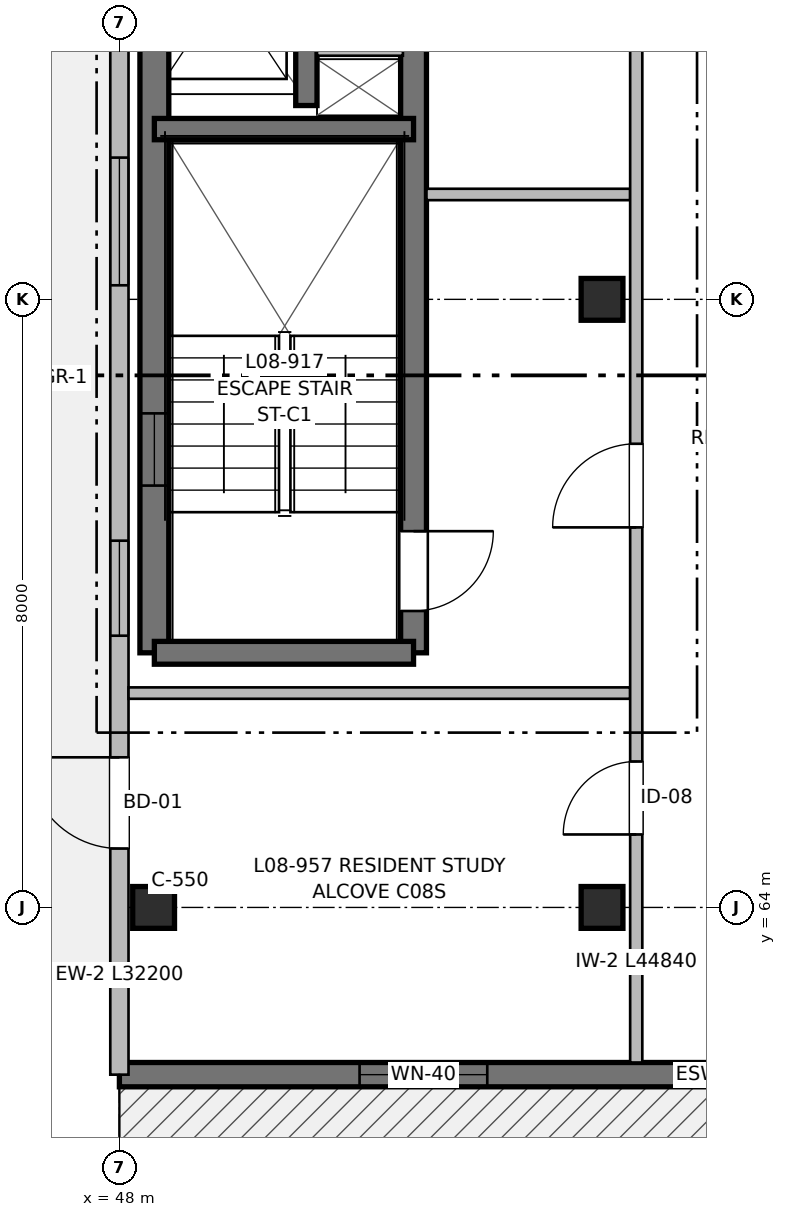
"""IFC4 building model, lengths in metres.
Left out: names, types, materials, properties, quantities, classifications, styles, units other than length and angle.
Written with IfcOpenShell. Run it as: python <this file> out.ifc"""

import sys

from ifc_helpers import new_model, si_unit, direction, frame, frame_2d, origin, origin_2d, place, context, subcontext, project, spatial, rectangle, extrude, element, fill, save


model = new_model("IFC4")
c1 = context("Model", 3, precision=1e-05, world=origin(), true_north=direction((0.0, 1.0)))
c2 = subcontext(c1, "Body", "Model", "MODEL_VIEW")
j1 = project(units=[si_unit("LENGTHUNIT", "METRE"), si_unit("PLANEANGLEUNIT", "RADIAN")], contexts=[c1])
p1 = place(None, origin())
s1 = spatial("IfcSite", under=j1, at=p1, CompositionType="ELEMENT")
p2 = place(p1, origin())
s2 = spatial("IfcBuilding", under=s1, at=p2, CompositionType="ELEMENT")
p3 = place(p2, frame((0.0, 0.0, 26.56)))
s3 = spatial("IfcBuildingStorey", under=s2, at=p3, CompositionType="ELEMENT", Elevation=26.56)
for number, where, z_axis, x_axis in (
    (1, (48.45, 64.0, 0.0), (0.0, 0.0, 1.0), (1.0, 0.0, 0.0)),
    (2, (54.35, 64.0, 0.0), (0.0, 0.0, 1.0), (1.0, 0.0, 0.0)),
    (3, (54.35, 72.0, 0.0), (0.0, 0.0, 1.0), (1.0, 0.0, 0.0)),
):
    element("IfcColumn", number, at=place(p3, frame(where, z_axis=z_axis, x_axis=x_axis)), inside=s3, PredefinedType="COLUMN", context=c2, shape_type="SweptSolid", body=[
        extrude(rectangle(XDim=0.55, YDim=0.55, at=origin_2d()), origin(), (0.0, 0.0, 1.0), 3.2),
    ])
p4 = place(p3, frame((48.46, 67.35, 0.0), z_axis=(0.0, 0.0, 1.0), x_axis=(0.0, 1.0, 0.0)))
e4 = element("IfcWall", 4, at=p4, inside=s3, PredefinedType="SHEAR", context=c2, shape_type="SweptSolid", body=[
    extrude(rectangle(XDim=12.45, YDim=0.38, at=frame_2d((6.225, 0.0))), origin(), (0.0, 0.0, 1.0), 3.2),
])
p5 = place(p4, frame((2.2, 0.0, 0.97)))
e5 = element("IfcOpeningElement", 5, at=p5, cuts=e4, PredefinedType="OPENING", context=c2, shape_type="SweptSolid", body=[
    extrude(rectangle(XDim=0.95, YDim=1.25, at=frame_2d((0.475, 0.625))), frame((0.0, 0.2, 0.0), z_axis=(0.0, -1.0, 0.0), x_axis=(1.0, 0.0, 0.0)), (0.0, 0.0, 1.0), 0.4),
])
p6 = place(p3, frame((51.87, 79.8, 0.0), z_axis=(0.0, 0.0, 1.0), x_axis=(0.0, -1.0, 0.0)))
e6 = element("IfcWall", 6, at=p6, inside=s3, PredefinedType="SHEAR", context=c2, shape_type="SweptSolid", body=[
    extrude(rectangle(XDim=12.45, YDim=0.34, at=frame_2d((6.225, 0.0))), origin(), (0.0, 0.0, 1.0), 3.2),
])
p7 = place(p6, frame((10.85, 0.0, 0.0)))
e7 = element("IfcOpeningElement", 7, at=p7, cuts=e6, PredefinedType="OPENING", context=c2, shape_type="SweptSolid", body=[
    extrude(rectangle(XDim=1.05, YDim=2.15, at=frame_2d((0.525, 1.075))), frame((0.0, 0.18, 0.0), z_axis=(0.0, -1.0, 0.0), x_axis=(1.0, 0.0, 0.0)), (0.0, 0.0, 1.0), 0.36),
])
p8 = place(p3, frame((51.87, 67.35, 0.0), z_axis=(0.0, 0.0, 1.0), x_axis=(-1.0, 0.0, 0.0)))
e8 = element("IfcWall", 8, at=p8, inside=s3, PredefinedType="SHEAR", context=c2, shape_type="SweptSolid", body=[
    extrude(rectangle(XDim=3.41, YDim=0.3, at=frame_2d((1.705, 0.0))), origin(), (0.0, 0.0, 1.0), 3.2),
])
p9 = place(p3, frame((48.46, 74.24, 0.0), z_axis=(0.0, 0.0, 1.0), x_axis=(1.0, 0.0, 0.0)))
e9 = element("IfcWall", 9, at=p9, inside=s3, PredefinedType="SHEAR", context=c2, shape_type="SweptSolid", body=[
    extrude(rectangle(XDim=3.41, YDim=0.28, at=frame_2d((1.705, 0.0))), origin(), (0.0, 0.0, 1.0), 3.2),
])
p10 = place(p3, frame((50.46, 74.55, 0.0), z_axis=(0.0, 0.0, 1.0), x_axis=(0.0, 1.0, 0.0)))
e10 = element("IfcWall", 10, at=p10, inside=s3, PredefinedType="SHEAR", context=c2, shape_type="SweptSolid", body=[
    extrude(rectangle(XDim=5.25, YDim=0.28, at=frame_2d((2.625, 0.0))), origin(), (0.0, 0.0, 1.0), 3.2),
])
p11 = place(p10, frame((1.15, 0.0, 0.0)))
e11 = element("IfcOpeningElement", 11, at=p11, cuts=e10, PredefinedType="OPENING", context=c2, shape_type="SweptSolid", body=[
    extrude(rectangle(XDim=1.0, YDim=2.15, at=frame_2d((0.5, 1.075))), frame((0.0, 0.15, 0.0), z_axis=(0.0, -1.0, 0.0), x_axis=(1.0, 0.0, 0.0)), (0.0, 0.0, 1.0), 0.3),
])
p12 = place(p10, frame((3.85, 0.0, 0.0)))
e12 = element("IfcOpeningElement", 12, at=p12, cuts=e10, PredefinedType="OPENING", context=c2, shape_type="SweptSolid", body=[
    extrude(rectangle(XDim=0.9, YDim=2.15, at=frame_2d((0.45, 1.075))), frame((0.0, 0.15, 0.0), z_axis=(0.0, -1.0, 0.0), x_axis=(1.0, 0.0, 0.0)), (0.0, 0.0, 1.0), 0.3),
])
p13 = place(p3, frame((50.6, 75.28, 0.0), z_axis=(0.0, 0.0, 1.0), x_axis=(1.0, 0.0, 0.0)))
e13 = element("IfcWall", 13, at=p13, inside=s3, PredefinedType="PARTITIONING", context=c2, shape_type="SweptSolid", body=[
    extrude(rectangle(XDim=1.13, YDim=0.15, at=frame_2d((0.565, 0.0))), origin(), (0.0, 0.0, 1.0), 2.95),
])
p14 = place(p3, frame((64.0, 61.8, 0.0), z_axis=(0.0, 0.0, 1.0), x_axis=(-1.0, 0.0, 0.0)))
e14 = element("IfcWall", 14, at=p14, inside=s3, PredefinedType="SHEAR", context=c2, shape_type="SweptSolid", body=[
    extrude(rectangle(XDim=16.0, YDim=0.32, at=frame_2d((8.0, 0.0))), origin(), (0.0, 0.0, 1.0), 2.98),
])
p15 = place(p14, frame((3.0, 0.0, 0.0)))
e15 = element("IfcOpeningElement", 15, at=p15, cuts=e14, PredefinedType="OPENING", context=c2, shape_type="SweptSolid", body=[
    extrude(rectangle(XDim=1.35, YDim=2.2, at=frame_2d((0.675, 1.1))), frame((0.0, 0.17, 0.0), z_axis=(0.0, -1.0, 0.0), x_axis=(1.0, 0.0, 0.0)), (0.0, 0.0, 1.0), 0.34),
])
p16 = place(p14, frame((11.16, 0.0, 0.72)))
e16 = element("IfcOpeningElement", 16, at=p16, cuts=e14, PredefinedType="OPENING", context=c2, shape_type="SweptSolid", body=[
    extrude(rectangle(XDim=1.68, YDim=1.5, at=frame_2d((0.84, 0.75))), frame((0.0, 0.17, 0.0), z_axis=(0.0, -1.0, 0.0), x_axis=(1.0, 0.0, 0.0)), (0.0, 0.0, 1.0), 0.34),
])
p17 = place(p3, frame((48.0, 61.8, 0.0), z_axis=(0.0, 0.0, 1.0), x_axis=(0.0, 1.0, 0.0)))
e17 = element("IfcWall", 17, at=p17, inside=s3, PredefinedType="SOLIDWALL", context=c2, shape_type="SweptSolid", body=[
    extrude(rectangle(XDim=32.2, YDim=0.24, at=frame_2d((16.1, 0.0))), origin(), (0.0, 0.0, 1.0), 2.98),
])
p18 = place(p17, frame((2.975, 0.0, 0.0)))
e18 = element("IfcOpeningElement", 18, at=p18, cuts=e17, PredefinedType="OPENING", context=c2, shape_type="SweptSolid", body=[
    extrude(rectangle(XDim=1.2, YDim=2.2, at=frame_2d((0.6, 1.1))), frame((0.0, 0.13, 0.0), z_axis=(0.0, -1.0, 0.0), x_axis=(1.0, 0.0, 0.0)), (0.0, 0.0, 1.0), 0.26),
])
p19 = place(p17, frame((5.775, 0.0, 0.87)))
e19 = element("IfcOpeningElement", 19, at=p19, cuts=e17, PredefinedType="OPENING", context=c2, shape_type="SweptSolid", body=[
    extrude(rectangle(XDim=1.25, YDim=1.35, at=frame_2d((0.625, 0.675))), frame((0.0, 0.13, 0.0), z_axis=(0.0, -1.0, 0.0), x_axis=(1.0, 0.0, 0.0)), (0.0, 0.0, 1.0), 0.26),
])
p20 = place(p17, frame((10.385, 0.0, 0.72)))
e20 = element("IfcOpeningElement", 20, at=p20, cuts=e17, PredefinedType="OPENING", context=c2, shape_type="SweptSolid", body=[
    extrude(rectangle(XDim=1.68, YDim=1.5, at=frame_2d((0.84, 0.75))), frame((0.0, 0.13, 0.0), z_axis=(0.0, -1.0, 0.0), x_axis=(1.0, 0.0, 0.0)), (0.0, 0.0, 1.0), 0.26),
])
p21 = place(p17, frame((18.375, 0.0, 0.72)))
e21 = element("IfcOpeningElement", 21, at=p21, cuts=e17, PredefinedType="OPENING", context=c2, shape_type="SweptSolid", body=[
    extrude(rectangle(XDim=1.8, YDim=1.5, at=frame_2d((0.9, 0.75))), frame((0.0, 0.13, 0.0), z_axis=(0.0, -1.0, 0.0), x_axis=(1.0, 0.0, 0.0)), (0.0, 0.0, 1.0), 0.26),
])
p22 = place(p17, frame((27.175, 0.0, 0.72)))
e22 = element("IfcOpeningElement", 22, at=p22, cuts=e17, PredefinedType="OPENING", context=c2, shape_type="SweptSolid", body=[
    extrude(rectangle(XDim=2.0, YDim=1.5, at=frame_2d((1.0, 0.75))), frame((0.0, 0.13, 0.0), z_axis=(0.0, -1.0, 0.0), x_axis=(1.0, 0.0, 0.0)), (0.0, 0.0, 1.0), 0.26),
])
p23 = place(p3, frame((48.12, 66.82, 0.0), z_axis=(0.0, 0.0, 1.0), x_axis=(1.0, 0.0, 0.0)))
e23 = element("IfcWall", 23, at=p23, inside=s3, PredefinedType="PARTITIONING", context=c2, shape_type="SweptSolid", body=[
    extrude(rectangle(XDim=6.6, YDim=0.15, at=frame_2d((3.3, 0.0))), origin(), (0.0, 0.0, 1.0), 2.935),
])
p24 = place(p3, frame((52.04, 73.38, 0.0), z_axis=(0.0, 0.0, 1.0), x_axis=(1.0, 0.0, 0.0)))
e24 = element("IfcWall", 24, at=p24, inside=s3, PredefinedType="PARTITIONING", context=c2, shape_type="SweptSolid", body=[
    extrude(rectangle(XDim=2.68, YDim=0.15, at=frame_2d((1.34, 0.0))), origin(), (0.0, 0.0, 1.0), 2.935),
])
p25 = place(p3, frame((54.8, 61.96, 0.0), z_axis=(0.0, 0.0, 1.0), x_axis=(0.0, 1.0, 0.0)))
e25 = element("IfcWall", 25, at=p25, inside=s3, PredefinedType="PARTITIONING", context=c2, shape_type="SweptSolid", body=[
    extrude(rectangle(XDim=44.84, YDim=0.16, at=frame_2d((22.42, 0.0))), origin(), (0.0, 0.0, 1.0), 2.935),
])
p26 = place(p25, frame((7.04, 0.0, 0.0)))
e26 = element("IfcOpeningElement", 26, at=p26, cuts=e25, PredefinedType="OPENING", context=c2, shape_type="SweptSolid", body=[
    extrude(rectangle(XDim=1.1, YDim=2.15, at=frame_2d((0.55, 1.075))), frame((0.0, 0.09, 0.0), z_axis=(0.0, -1.0, 0.0), x_axis=(1.0, 0.0, 0.0)), (0.0, 0.0, 1.0), 0.18),
])
p27 = place(p25, frame((13.44, 0.0, 0.0)))
e27 = element("IfcOpeningElement", 27, at=p27, cuts=e25, PredefinedType="OPENING", context=c2, shape_type="SweptSolid", body=[
    extrude(rectangle(XDim=1.6, YDim=2.15, at=frame_2d((0.8, 1.075))), frame((0.0, 0.09, 0.0), z_axis=(0.0, -1.0, 0.0), x_axis=(1.0, 0.0, 0.0)), (0.0, 0.0, 1.0), 0.18),
])
p28 = place(p25, frame((3.0, 0.0, 0.0)))
e28 = element("IfcOpeningElement", 28, at=p28, cuts=e25, PredefinedType="OPENING", context=c2, shape_type="SweptSolid", body=[
    extrude(rectangle(XDim=0.96, YDim=2.15, at=frame_2d((0.48, 1.075))), frame((0.0, 0.09, 0.0), z_axis=(0.0, -1.0, 0.0), x_axis=(1.0, 0.0, 0.0)), (0.0, 0.0, 1.0), 0.18),
])
p29 = place(p25, frame((26.845, 0.0, 0.0)))
e29 = element("IfcOpeningElement", 29, at=p29, cuts=e25, PredefinedType="OPENING", context=c2, shape_type="SweptSolid", body=[
    extrude(rectangle(XDim=0.98, YDim=2.15, at=frame_2d((0.49, 1.075))), frame((0.0, 0.09, 0.0), z_axis=(0.0, -1.0, 0.0), x_axis=(1.0, 0.0, 0.0)), (0.0, 0.0, 1.0), 0.18),
])
p30 = place(p25, frame((35.455, 0.0, 0.0)))
e30 = element("IfcOpeningElement", 30, at=p30, cuts=e25, PredefinedType="OPENING", context=c2, shape_type="SweptSolid", body=[
    extrude(rectangle(XDim=0.98, YDim=2.15, at=frame_2d((0.49, 1.075))), frame((0.0, 0.09, 0.0), z_axis=(0.0, -1.0, 0.0), x_axis=(1.0, 0.0, 0.0)), (0.0, 0.0, 1.0), 0.18),
])
p31 = place(p7, origin())
e31 = element("IfcDoor", 31, at=p31, inside=s3, OperationType="SINGLE_SWING_LEFT", PredefinedType="DOOR", context=c2, shape_type="SweptSolid", body=[
    extrude(rectangle(XDim=1.05, YDim=2.15, at=frame_2d((0.525, 1.075))), frame((0.0, 0.025, 0.0), z_axis=(0.0, -1.0, 0.0), x_axis=(1.0, 0.0, 0.0)), (0.0, 0.0, 1.0), 0.05),
])
fill(e7, e31)
p32 = place(p5, origin())
e32 = element("IfcWindow", 32, at=p32, inside=s3, PartitioningType="SINGLE_PANEL", PredefinedType="WINDOW", context=c2, shape_type="SweptSolid", body=[
    extrude(rectangle(XDim=0.95, YDim=1.25, at=frame_2d((0.475, 0.625))), frame((0.0, 0.03, 0.0), z_axis=(0.0, -1.0, 0.0), x_axis=(1.0, 0.0, 0.0)), (0.0, 0.0, 1.0), 0.06),
])
fill(e5, e32)
p33 = place(p16, origin())
e33 = element("IfcWindow", 33, at=p33, inside=s3, PartitioningType="SINGLE_PANEL", PredefinedType="WINDOW", context=c2, shape_type="SweptSolid", body=[
    extrude(rectangle(XDim=1.68, YDim=1.5, at=frame_2d((0.84, 0.75))), frame((0.0, 0.03, 0.0), z_axis=(0.0, -1.0, 0.0), x_axis=(1.0, 0.0, 0.0)), (0.0, 0.0, 1.0), 0.06),
])
fill(e16, e33)
p34 = place(p18, origin())
e34 = element("IfcDoor", 34, at=p34, inside=s3, OperationType="SINGLE_SWING_RIGHT", PredefinedType="DOOR", context=c2, shape_type="SweptSolid", body=[
    extrude(rectangle(XDim=1.2, YDim=2.2, at=frame_2d((0.6, 1.1))), frame((0.0, 0.025, 0.0), z_axis=(0.0, -1.0, 0.0), x_axis=(1.0, 0.0, 0.0)), (0.0, 0.0, 1.0), 0.05),
])
fill(e18, e34)
p35 = place(p19, origin())
e35 = element("IfcWindow", 35, at=p35, inside=s3, PartitioningType="SINGLE_PANEL", PredefinedType="WINDOW", context=c2, shape_type="SweptSolid", body=[
    extrude(rectangle(XDim=1.25, YDim=1.35, at=frame_2d((0.625, 0.675))), frame((0.0, 0.03, 0.0), z_axis=(0.0, -1.0, 0.0), x_axis=(1.0, 0.0, 0.0)), (0.0, 0.0, 1.0), 0.06),
])
fill(e19, e35)
p36 = place(p20, origin())
e36 = element("IfcWindow", 36, at=p36, inside=s3, PartitioningType="SINGLE_PANEL", PredefinedType="WINDOW", context=c2, shape_type="SweptSolid", body=[
    extrude(rectangle(XDim=1.68, YDim=1.5, at=frame_2d((0.84, 0.75))), frame((0.0, 0.03, 0.0), z_axis=(0.0, -1.0, 0.0), x_axis=(1.0, 0.0, 0.0)), (0.0, 0.0, 1.0), 0.06),
])
fill(e20, e36)
p37 = place(p26, origin())
e37 = element("IfcDoor", 37, at=p37, inside=s3, OperationType="SINGLE_SWING_LEFT", PredefinedType="DOOR", context=c2, shape_type="SweptSolid", body=[
    extrude(rectangle(XDim=1.1, YDim=2.15, at=frame_2d((0.55, 1.075))), frame((0.0, 0.025, 0.0), z_axis=(0.0, -1.0, 0.0), x_axis=(1.0, 0.0, 0.0)), (0.0, 0.0, 1.0), 0.05),
])
fill(e26, e37)
p38 = place(p28, origin())
e38 = element("IfcDoor", 38, at=p38, inside=s3, OperationType="SINGLE_SWING_LEFT", PredefinedType="DOOR", context=c2, shape_type="SweptSolid", body=[
    extrude(rectangle(XDim=0.96, YDim=2.15, at=frame_2d((0.48, 1.075))), frame((0.0, 0.025, 0.0), z_axis=(0.0, -1.0, 0.0), x_axis=(1.0, 0.0, 0.0)), (0.0, 0.0, 1.0), 0.05),
])
fill(e28, e38)
save(model, sys.argv[1])
